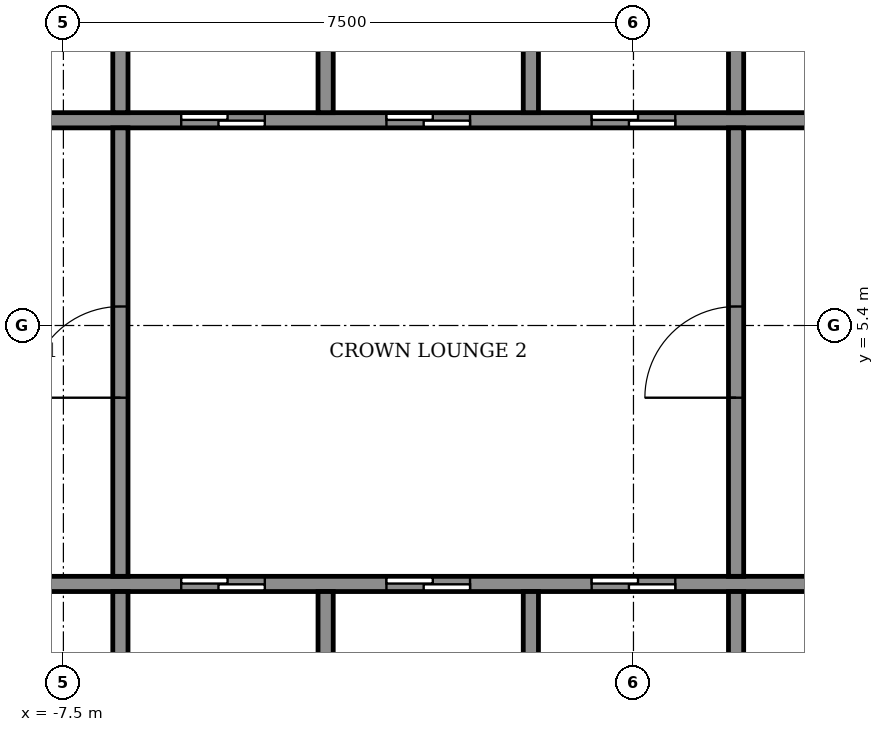
"""IFC4 building model, lengths in metres.
Left out: names, types, materials, properties, quantities, classifications, styles, units other than length and angle.
Written with IfcOpenShell. Run it as: python <this file> out.ifc"""

import sys

from ifc_helpers import new_model, si_unit, direction, frame, frame_2d, origin, place, context, subcontext, project, spatial, rectangle, extrude, element, fill, save


model = new_model("IFC4")
c1 = context("Model", 3, precision=1e-05, world=origin(), true_north=direction((0.0, 1.0)))
c2 = subcontext(c1, "Body", "Model", "MODEL_VIEW")
j1 = project(units=[si_unit("LENGTHUNIT", "METRE"), si_unit("PLANEANGLEUNIT", "RADIAN")], contexts=[c1])
p1 = place(None, origin())
s1 = spatial("IfcSite", under=j1, at=p1, CompositionType="ELEMENT")
p2 = place(p1, origin())
s2 = spatial("IfcBuilding", under=s1, at=p2, CompositionType="ELEMENT")
p3 = place(p2, frame((0.0, 0.0, 350.7)))
s3 = spatial("IfcBuildingStorey", under=s2, at=p3, CompositionType="ELEMENT", Elevation=350.7)
p4 = place(p3, frame((-10.9, 2.0, 0.0), z_axis=(0.0, 0.0, 1.0), x_axis=(1.0, 0.0, 0.0)))
e1 = element("IfcWall", 1, at=p4, inside=s3, PredefinedType="SHEAR", context=c2, shape_type="SweptSolid", body=[
    extrude(rectangle(XDim=21.8, YDim=0.2, at=frame_2d((10.9, 0.0))), origin(), (0.0, 0.0, 1.0), 3.05),
])
p5 = place(p4, frame((4.95, 0.0, 0.0)))
e2 = element("IfcOpeningElement", 2, at=p5, cuts=e1, PredefinedType="OPENING", context=c2, shape_type="SweptSolid", body=[
    extrude(rectangle(XDim=1.1, YDim=2.1, at=frame_2d((0.55, 1.05))), frame((0.0, 0.11, 0.0), z_axis=(0.0, -1.0, 0.0), x_axis=(1.0, 0.0, 0.0)), (0.0, 0.0, 1.0), 0.22),
])
p6 = place(p4, frame((7.65, 0.0, 0.0)))
e3 = element("IfcOpeningElement", 3, at=p6, cuts=e1, PredefinedType="OPENING", context=c2, shape_type="SweptSolid", body=[
    extrude(rectangle(XDim=1.1, YDim=2.1, at=frame_2d((0.55, 1.05))), frame((0.0, 0.11, 0.0), z_axis=(0.0, -1.0, 0.0), x_axis=(1.0, 0.0, 0.0)), (0.0, 0.0, 1.0), 0.22),
])
p7 = place(p4, frame((10.35, 0.0, 0.0)))
e4 = element("IfcOpeningElement", 4, at=p7, cuts=e1, PredefinedType="OPENING", context=c2, shape_type="SweptSolid", body=[
    extrude(rectangle(XDim=1.1, YDim=2.1, at=frame_2d((0.55, 1.05))), frame((0.0, 0.11, 0.0), z_axis=(0.0, -1.0, 0.0), x_axis=(1.0, 0.0, 0.0)), (0.0, 0.0, 1.0), 0.22),
])
p8 = place(p4, frame((1.675, 0.0, 0.0)))
e5 = element("IfcOpeningElement", 5, at=p8, cuts=e1, PredefinedType="OPENING", context=c2, shape_type="SweptSolid", body=[
    extrude(rectangle(XDim=0.9, YDim=2.1, at=frame_2d((0.45, 1.05))), frame((0.0, 0.11, 0.0), z_axis=(0.0, -1.0, 0.0), x_axis=(1.0, 0.0, 0.0)), (0.0, 0.0, 1.0), 0.22),
])
p9 = place(p4, frame((14.5, 0.0, 0.0)))
e6 = element("IfcOpeningElement", 6, at=p9, cuts=e1, PredefinedType="OPENING", context=c2, shape_type="SweptSolid", body=[
    extrude(rectangle(XDim=0.9, YDim=2.1, at=frame_2d((0.45, 1.05))), frame((0.0, 0.11, 0.0), z_axis=(0.0, -1.0, 0.0), x_axis=(1.0, 0.0, 0.0)), (0.0, 0.0, 1.0), 0.22),
])
p10 = place(p4, frame((19.225, 0.0, 0.0)))
e7 = element("IfcOpeningElement", 7, at=p10, cuts=e1, PredefinedType="OPENING", context=c2, shape_type="SweptSolid", body=[
    extrude(rectangle(XDim=0.9, YDim=2.1, at=frame_2d((0.45, 1.05))), frame((0.0, 0.11, 0.0), z_axis=(0.0, -1.0, 0.0), x_axis=(1.0, 0.0, 0.0)), (0.0, 0.0, 1.0), 0.22),
])
p11 = place(p3, frame((-10.9, 8.1, 0.0), z_axis=(0.0, 0.0, 1.0), x_axis=(1.0, 0.0, 0.0)))
e8 = element("IfcWall", 8, at=p11, inside=s3, PredefinedType="SHEAR", context=c2, shape_type="SweptSolid", body=[
    extrude(rectangle(XDim=21.8, YDim=0.2, at=frame_2d((10.9, 0.0))), origin(), (0.0, 0.0, 1.0), 3.05),
])
p12 = place(p11, frame((4.95, 0.0, 0.0)))
e9 = element("IfcOpeningElement", 9, at=p12, cuts=e8, PredefinedType="OPENING", context=c2, shape_type="SweptSolid", body=[
    extrude(rectangle(XDim=1.1, YDim=2.1, at=frame_2d((0.55, 1.05))), frame((0.0, 0.11, 0.0), z_axis=(0.0, -1.0, 0.0), x_axis=(1.0, 0.0, 0.0)), (0.0, 0.0, 1.0), 0.22),
])
p13 = place(p11, frame((7.65, 0.0, 0.0)))
e10 = element("IfcOpeningElement", 10, at=p13, cuts=e8, PredefinedType="OPENING", context=c2, shape_type="SweptSolid", body=[
    extrude(rectangle(XDim=1.1, YDim=2.1, at=frame_2d((0.55, 1.05))), frame((0.0, 0.11, 0.0), z_axis=(0.0, -1.0, 0.0), x_axis=(1.0, 0.0, 0.0)), (0.0, 0.0, 1.0), 0.22),
])
p14 = place(p11, frame((10.35, 0.0, 0.0)))
e11 = element("IfcOpeningElement", 11, at=p14, cuts=e8, PredefinedType="OPENING", context=c2, shape_type="SweptSolid", body=[
    extrude(rectangle(XDim=1.1, YDim=2.1, at=frame_2d((0.55, 1.05))), frame((0.0, 0.11, 0.0), z_axis=(0.0, -1.0, 0.0), x_axis=(1.0, 0.0, 0.0)), (0.0, 0.0, 1.0), 0.22),
])
p15 = place(p11, frame((1.675, 0.0, 0.0)))
e12 = element("IfcOpeningElement", 12, at=p15, cuts=e8, PredefinedType="OPENING", context=c2, shape_type="SweptSolid", body=[
    extrude(rectangle(XDim=0.9, YDim=2.1, at=frame_2d((0.45, 1.05))), frame((0.0, 0.11, 0.0), z_axis=(0.0, -1.0, 0.0), x_axis=(1.0, 0.0, 0.0)), (0.0, 0.0, 1.0), 0.22),
])
p16 = place(p11, frame((14.5, 0.0, 0.0)))
e13 = element("IfcOpeningElement", 13, at=p16, cuts=e8, PredefinedType="OPENING", context=c2, shape_type="SweptSolid", body=[
    extrude(rectangle(XDim=0.9, YDim=2.1, at=frame_2d((0.45, 1.05))), frame((0.0, 0.11, 0.0), z_axis=(0.0, -1.0, 0.0), x_axis=(1.0, 0.0, 0.0)), (0.0, 0.0, 1.0), 0.22),
])
p17 = place(p11, frame((19.225, 0.0, 0.0)))
e14 = element("IfcOpeningElement", 14, at=p17, cuts=e8, PredefinedType="OPENING", context=c2, shape_type="SweptSolid", body=[
    extrude(rectangle(XDim=0.9, YDim=2.1, at=frame_2d((0.45, 1.05))), frame((0.0, 0.11, 0.0), z_axis=(0.0, -1.0, 0.0), x_axis=(1.0, 0.0, 0.0)), (0.0, 0.0, 1.0), 0.22),
])
for number, where, z_axis, x_axis in (
    (15, (-6.75, -0.6, 0.0), (0.0, 0.0, 1.0), (0.0, 1.0, 0.0)),
    (16, (-4.05, -0.6, 0.0), (0.0, 0.0, 1.0), (0.0, 1.0, 0.0)),
    (17, (-1.35, -0.6, 0.0), (0.0, 0.0, 1.0), (0.0, 1.0, 0.0)),
    (18, (1.35, -0.6, 0.0), (0.0, 0.0, 1.0), (0.0, 1.0, 0.0)),
):
    element("IfcWall", number, at=place(p3, frame(where, z_axis=z_axis, x_axis=x_axis)), inside=s3, PredefinedType="SHEAR", context=c2, shape_type="SweptSolid", body=[
        extrude(rectangle(XDim=2.5, YDim=0.2, at=frame_2d((1.25, 0.0))), origin(), (0.0, 0.0, 1.0), 3.05),
    ])
for number, where, z_axis, x_axis in (
    (19, (-6.75, 8.2, 0.0), (0.0, 0.0, 1.0), (0.0, 1.0, 0.0)),
    (20, (-4.05, 8.2, 0.0), (0.0, 0.0, 1.0), (0.0, 1.0, 0.0)),
    (21, (-1.35, 8.2, 0.0), (0.0, 0.0, 1.0), (0.0, 1.0, 0.0)),
    (22, (1.35, 8.2, 0.0), (0.0, 0.0, 1.0), (0.0, 1.0, 0.0)),
):
    element("IfcWall", number, at=place(p3, frame(where, z_axis=z_axis, x_axis=x_axis)), inside=s3, PredefinedType="SHEAR", context=c2, shape_type="SweptSolid", body=[
        extrude(rectangle(XDim=2.6, YDim=0.2, at=frame_2d((1.3, 0.0))), origin(), (0.0, 0.0, 1.0), 3.05),
    ])
p18 = place(p3, frame((-6.75, 2.1, 0.0), z_axis=(0.0, 0.0, 1.0), x_axis=(0.0, 1.0, 0.0)))
e23 = element("IfcWall", 23, at=p18, inside=s3, PredefinedType="STANDARD", context=c2, shape_type="SweptSolid", body=[
    extrude(rectangle(XDim=5.9, YDim=0.2, at=frame_2d((2.95, 0.0))), origin(), (0.0, 0.0, 1.0), 3.05),
])
p19 = place(p18, frame((2.35, 0.0, 0.0)))
e24 = element("IfcOpeningElement", 24, at=p19, cuts=e23, PredefinedType="OPENING", context=c2, shape_type="SweptSolid", body=[
    extrude(rectangle(XDim=1.2, YDim=2.1, at=frame_2d((0.6, 1.05))), frame((0.0, 0.11, 0.0), z_axis=(0.0, -1.0, 0.0), x_axis=(1.0, 0.0, 0.0)), (0.0, 0.0, 1.0), 0.22),
])
p20 = place(p3, frame((1.35, 2.1, 0.0), z_axis=(0.0, 0.0, 1.0), x_axis=(0.0, 1.0, 0.0)))
e25 = element("IfcWall", 25, at=p20, inside=s3, PredefinedType="STANDARD", context=c2, shape_type="SweptSolid", body=[
    extrude(rectangle(XDim=5.9, YDim=0.2, at=frame_2d((2.95, 0.0))), origin(), (0.0, 0.0, 1.0), 3.05),
])
p21 = place(p20, frame((2.35, 0.0, 0.0)))
e26 = element("IfcOpeningElement", 26, at=p21, cuts=e25, PredefinedType="OPENING", context=c2, shape_type="SweptSolid", body=[
    extrude(rectangle(XDim=1.2, YDim=2.1, at=frame_2d((0.6, 1.05))), frame((0.0, 0.11, 0.0), z_axis=(0.0, -1.0, 0.0), x_axis=(1.0, 0.0, 0.0)), (0.0, 0.0, 1.0), 0.22),
])
p22 = place(p5, origin())
e27 = element("IfcDoor", 27, at=p22, inside=s3, OperationType="SLIDING_TO_LEFT", PredefinedType="DOOR", context=c2, shape_type="SweptSolid", body=[
    extrude(rectangle(XDim=1.1, YDim=2.1, at=frame_2d((0.55, 1.05))), frame((0.0, 0.025, 0.0), z_axis=(0.0, -1.0, 0.0), x_axis=(1.0, 0.0, 0.0)), (0.0, 0.0, 1.0), 0.05),
])
fill(e2, e27)
p23 = place(p6, origin())
e28 = element("IfcDoor", 28, at=p23, inside=s3, OperationType="SLIDING_TO_LEFT", PredefinedType="DOOR", context=c2, shape_type="SweptSolid", body=[
    extrude(rectangle(XDim=1.1, YDim=2.1, at=frame_2d((0.55, 1.05))), frame((0.0, 0.025, 0.0), z_axis=(0.0, -1.0, 0.0), x_axis=(1.0, 0.0, 0.0)), (0.0, 0.0, 1.0), 0.05),
])
fill(e3, e28)
p24 = place(p7, origin())
e29 = element("IfcDoor", 29, at=p24, inside=s3, OperationType="SLIDING_TO_LEFT", PredefinedType="DOOR", context=c2, shape_type="SweptSolid", body=[
    extrude(rectangle(XDim=1.1, YDim=2.1, at=frame_2d((0.55, 1.05))), frame((0.0, 0.025, 0.0), z_axis=(0.0, -1.0, 0.0), x_axis=(1.0, 0.0, 0.0)), (0.0, 0.0, 1.0), 0.05),
])
fill(e4, e29)
p25 = place(p12, origin())
e30 = element("IfcDoor", 30, at=p25, inside=s3, OperationType="SLIDING_TO_LEFT", PredefinedType="DOOR", context=c2, shape_type="SweptSolid", body=[
    extrude(rectangle(XDim=1.1, YDim=2.1, at=frame_2d((0.55, 1.05))), frame((0.0, 0.025, 0.0), z_axis=(0.0, -1.0, 0.0), x_axis=(1.0, 0.0, 0.0)), (0.0, 0.0, 1.0), 0.05),
])
fill(e9, e30)
p26 = place(p13, origin())
e31 = element("IfcDoor", 31, at=p26, inside=s3, OperationType="SLIDING_TO_LEFT", PredefinedType="DOOR", context=c2, shape_type="SweptSolid", body=[
    extrude(rectangle(XDim=1.1, YDim=2.1, at=frame_2d((0.55, 1.05))), frame((0.0, 0.025, 0.0), z_axis=(0.0, -1.0, 0.0), x_axis=(1.0, 0.0, 0.0)), (0.0, 0.0, 1.0), 0.05),
])
fill(e10, e31)
p27 = place(p14, origin())
e32 = element("IfcDoor", 32, at=p27, inside=s3, OperationType="SLIDING_TO_LEFT", PredefinedType="DOOR", context=c2, shape_type="SweptSolid", body=[
    extrude(rectangle(XDim=1.1, YDim=2.1, at=frame_2d((0.55, 1.05))), frame((0.0, 0.025, 0.0), z_axis=(0.0, -1.0, 0.0), x_axis=(1.0, 0.0, 0.0)), (0.0, 0.0, 1.0), 0.05),
])
fill(e11, e32)
p28 = place(p19, origin())
e33 = element("IfcDoor", 33, at=p28, inside=s3, OperationType="SINGLE_SWING_LEFT", PredefinedType="DOOR", context=c2, shape_type="SweptSolid", body=[
    extrude(rectangle(XDim=1.2, YDim=2.1, at=frame_2d((0.6, 1.05))), frame((0.0, 0.025, 0.0), z_axis=(0.0, -1.0, 0.0), x_axis=(1.0, 0.0, 0.0)), (0.0, 0.0, 1.0), 0.05),
])
fill(e24, e33)
p29 = place(p21, origin())
e34 = element("IfcDoor", 34, at=p29, inside=s3, OperationType="SINGLE_SWING_LEFT", PredefinedType="DOOR", context=c2, shape_type="SweptSolid", body=[
    extrude(rectangle(XDim=1.2, YDim=2.1, at=frame_2d((0.6, 1.05))), frame((0.0, 0.025, 0.0), z_axis=(0.0, -1.0, 0.0), x_axis=(1.0, 0.0, 0.0)), (0.0, 0.0, 1.0), 0.05),
])
fill(e26, e34)
save(model, sys.argv[1])
